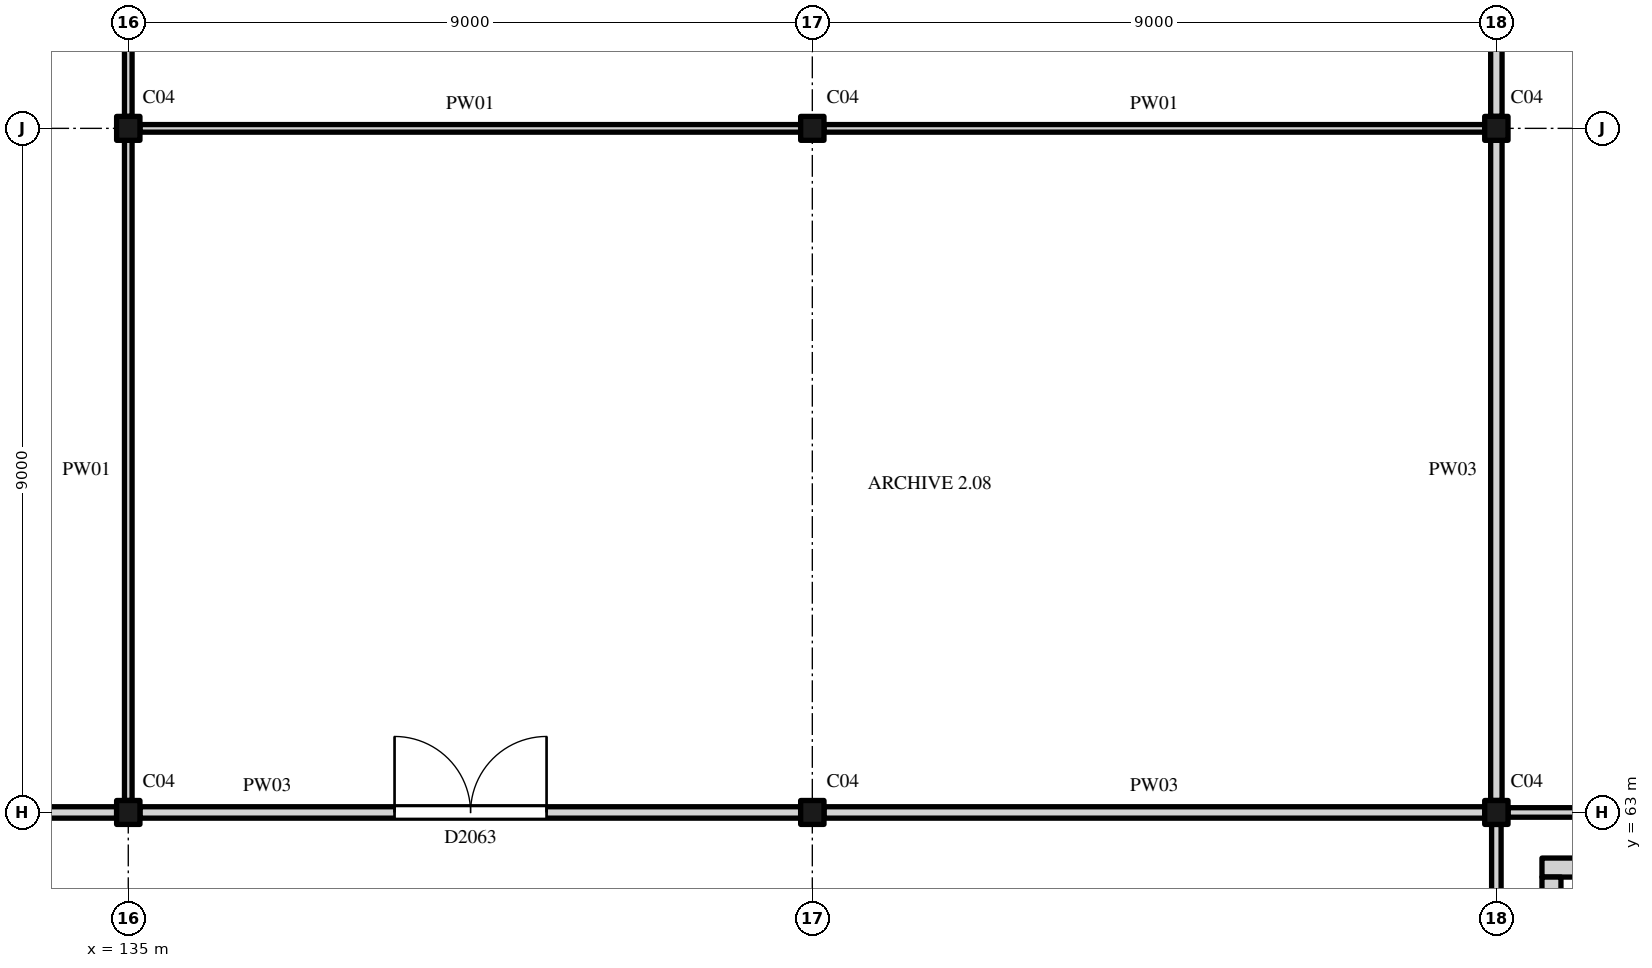
"""IFC4 building model, lengths in metres.
Left out: names, types, materials, properties, quantities, classifications, styles, units other than length and angle.
Written with IfcOpenShell. Run it as: python <this file> out.ifc"""

import sys

from ifc_helpers import new_model, si_unit, direction, frame, frame_2d, origin, origin_2d, place, context, subcontext, project, spatial, rectangle, i_section, extrude, element, fill, save


model = new_model("IFC4")
c1 = context("Model", 3, precision=1e-05, world=origin(), true_north=direction((0.0, 1.0)))
c2 = subcontext(c1, "Body", "Model", "MODEL_VIEW")
j1 = project(units=[si_unit("LENGTHUNIT", "METRE"), si_unit("PLANEANGLEUNIT", "RADIAN")], contexts=[c1])
p1 = place(None, origin())
s1 = spatial("IfcSite", under=j1, at=p1, CompositionType="ELEMENT")
p2 = place(p1, origin())
s2 = spatial("IfcBuilding", under=s1, at=p2, CompositionType="ELEMENT")
p3 = place(p2, frame((0.0, 0.0, 11.0)))
s3 = spatial("IfcBuildingStorey", under=s2, at=p3, CompositionType="ELEMENT", Elevation=11.0)
for number, where, z_axis, x_axis in (
    (1, (135.0, 63.0, 0.0), (0.0, 0.0, 1.0), (1.0, 0.0, 0.0)),
    (2, (144.0, 63.0, 0.0), (0.0, 0.0, 1.0), (1.0, 0.0, 0.0)),
    (3, (153.0, 63.0, 0.0), (0.0, 0.0, 1.0), (1.0, 0.0, 0.0)),
    (4, (135.0, 72.0, 0.0), (0.0, 0.0, 1.0), (1.0, 0.0, 0.0)),
    (5, (144.0, 72.0, 0.0), (0.0, 0.0, 1.0), (1.0, 0.0, 0.0)),
    (6, (153.0, 72.0, 0.0), (0.0, 0.0, 1.0), (1.0, 0.0, 0.0)),
):
    element("IfcColumn", number, at=place(p3, frame(where, z_axis=z_axis, x_axis=x_axis)), inside=s3, PredefinedType="COLUMN", context=c2, shape_type="SweptSolid", body=[
        extrude(i_section(OverallWidth=0.307, OverallDepth=0.315, WebThickness=0.012, FlangeThickness=0.019, FilletRadius=0.017, at=origin_2d()), origin(), (0.0, 0.0, 1.0), 5.0),
    ])
p4 = place(p3, frame((153.6, 62.275, 0.0), z_axis=(0.0, 0.0, 1.0), x_axis=(1.0, 0.0, 0.0)))
e7 = element("IfcWall", 7, at=p4, inside=s3, PredefinedType="STANDARD", context=c2, shape_type="SweptSolid", body=[
    extrude(rectangle(XDim=1.8, YDim=0.25, at=frame_2d((0.9, 0.0))), origin(), (0.0, 0.0, 1.0), 5.0),
])
p5 = place(p3, frame((153.725, 59.65, 0.0), z_axis=(0.0, 0.0, 1.0), x_axis=(0.0, 1.0, 0.0)))
e8 = element("IfcWall", 8, at=p5, inside=s3, PredefinedType="STANDARD", context=c2, shape_type="SweptSolid", body=[
    extrude(rectangle(XDim=2.5, YDim=0.25, at=frame_2d((1.25, 0.0))), origin(), (0.0, 0.0, 1.0), 5.0),
])
p6 = place(p3, frame((126.154, 63.0, 0.0), z_axis=(0.0, 0.0, 1.0), x_axis=(1.0, 0.0, 0.0)))
e9 = element("IfcWall", 9, at=p6, inside=s3, PredefinedType="PARTITIONING", context=c2, shape_type="SweptSolid", body=[
    extrude(rectangle(XDim=8.693, YDim=0.15, at=frame_2d((4.346, 0.0))), origin(), (0.0, 0.0, 1.0), 4.469),
])
p7 = place(p3, frame((135.154, 63.0, 0.0), z_axis=(0.0, 0.0, 1.0), x_axis=(1.0, 0.0, 0.0)))
e10 = element("IfcWall", 10, at=p7, inside=s3, PredefinedType="PARTITIONING", context=c2, shape_type="SweptSolid", body=[
    extrude(rectangle(XDim=8.693, YDim=0.15, at=frame_2d((4.346, 0.0))), origin(), (0.0, 0.0, 1.0), 4.469),
])
p8 = place(p7, frame((3.35, 0.0, 0.0)))
e11 = element("IfcOpeningElement", 11, at=p8, cuts=e10, PredefinedType="OPENING", context=c2, shape_type="SweptSolid", body=[
    extrude(rectangle(XDim=2.0, YDim=2.4, at=frame_2d((1.0, 1.2))), frame((0.0, 0.085, 0.0), z_axis=(0.0, -1.0, 0.0), x_axis=(1.0, 0.0, 0.0)), (0.0, 0.0, 1.0), 0.17),
])
p9 = place(p3, frame((144.154, 63.0, 0.0), z_axis=(0.0, 0.0, 1.0), x_axis=(1.0, 0.0, 0.0)))
e12 = element("IfcWall", 12, at=p9, inside=s3, PredefinedType="PARTITIONING", context=c2, shape_type="SweptSolid", body=[
    extrude(rectangle(XDim=8.693, YDim=0.15, at=frame_2d((4.346, 0.0))), origin(), (0.0, 0.0, 1.0), 4.469),
])
p10 = place(p3, frame((153.154, 63.0, 0.0), z_axis=(0.0, 0.0, 1.0), x_axis=(1.0, 0.0, 0.0)))
e13 = element("IfcWall", 13, at=p10, inside=s3, PredefinedType="PARTITIONING", context=c2, shape_type="SweptSolid", body=[
    extrude(rectangle(XDim=5.921, YDim=0.125, at=frame_2d((2.961, 0.0))), origin(), (0.0, 0.0, 1.0), 4.469),
])
p11 = place(p10, frame((2.25, 0.0, 0.0)))
e14 = element("IfcOpeningElement", 14, at=p11, cuts=e13, PredefinedType="OPENING", context=c2, shape_type="SweptSolid", body=[
    extrude(rectangle(XDim=1.0, YDim=2.1, at=frame_2d((0.5, 1.05))), frame((0.0, 0.073, 0.0), z_axis=(0.0, -1.0, 0.0), x_axis=(1.0, 0.0, 0.0)), (0.0, 0.0, 1.0), 0.145),
])
for number, where, z_axis, x_axis in (
    (15, (135.154, 72.0, 0.0), (0.0, 0.0, 1.0), (1.0, 0.0, 0.0)),
    (16, (144.154, 72.0, 0.0), (0.0, 0.0, 1.0), (1.0, 0.0, 0.0)),
):
    element("IfcWall", number, at=place(p3, frame(where, z_axis=z_axis, x_axis=x_axis)), inside=s3, PredefinedType="PARTITIONING", context=c2, shape_type="SweptSolid", body=[
        extrude(rectangle(XDim=8.693, YDim=0.1, at=frame_2d((4.346, 0.0))), origin(), (0.0, 0.0, 1.0), 4.469),
    ])
for number, where, z_axis, x_axis in (
    (17, (135.0, 63.157, 0.0), (0.0, 0.0, 1.0), (0.0, 1.0, 0.0)),
    (18, (135.0, 72.157, 0.0), (0.0, 0.0, 1.0), (0.0, 1.0, 0.0)),
):
    element("IfcWall", number, at=place(p3, frame(where, z_axis=z_axis, x_axis=x_axis)), inside=s3, PredefinedType="PARTITIONING", context=c2, shape_type="SweptSolid", body=[
        extrude(rectangle(XDim=8.686, YDim=0.1, at=frame_2d((4.343, 0.0))), origin(), (0.0, 0.0, 1.0), 4.371),
    ])
p12 = place(p3, frame((153.0, 59.462, 0.0), z_axis=(0.0, 0.0, 1.0), x_axis=(0.0, 1.0, 0.0)))
e19 = element("IfcWall", 19, at=p12, inside=s3, PredefinedType="PARTITIONING", context=c2, shape_type="SweptSolid", body=[
    extrude(rectangle(XDim=3.38, YDim=0.125, at=frame_2d((1.69, 0.0))), origin(), (0.0, 0.0, 1.0), 4.371),
])
for number, where, z_axis, x_axis in (
    (20, (153.0, 63.157, 0.0), (0.0, 0.0, 1.0), (0.0, 1.0, 0.0)),
    (21, (153.0, 72.157, 0.0), (0.0, 0.0, 1.0), (0.0, 1.0, 0.0)),
):
    element("IfcWall", number, at=place(p3, frame(where, z_axis=z_axis, x_axis=x_axis)), inside=s3, PredefinedType="PARTITIONING", context=c2, shape_type="SweptSolid", body=[
        extrude(rectangle(XDim=8.686, YDim=0.15, at=frame_2d((4.343, 0.0))), origin(), (0.0, 0.0, 1.0), 4.371),
    ])
p13 = place(p8, origin())
e22 = element("IfcDoor", 22, at=p13, inside=s3, OperationType="DOUBLE_DOOR_SINGLE_SWING", PredefinedType="DOOR", context=c2, shape_type="SweptSolid", body=[
    extrude(rectangle(XDim=2.0, YDim=2.4, at=frame_2d((1.0, 1.2))), frame((0.0, 0.025, 0.0), z_axis=(0.0, -1.0, 0.0), x_axis=(1.0, 0.0, 0.0)), (0.0, 0.0, 1.0), 0.05),
])
fill(e11, e22)
save(model, sys.argv[1])
